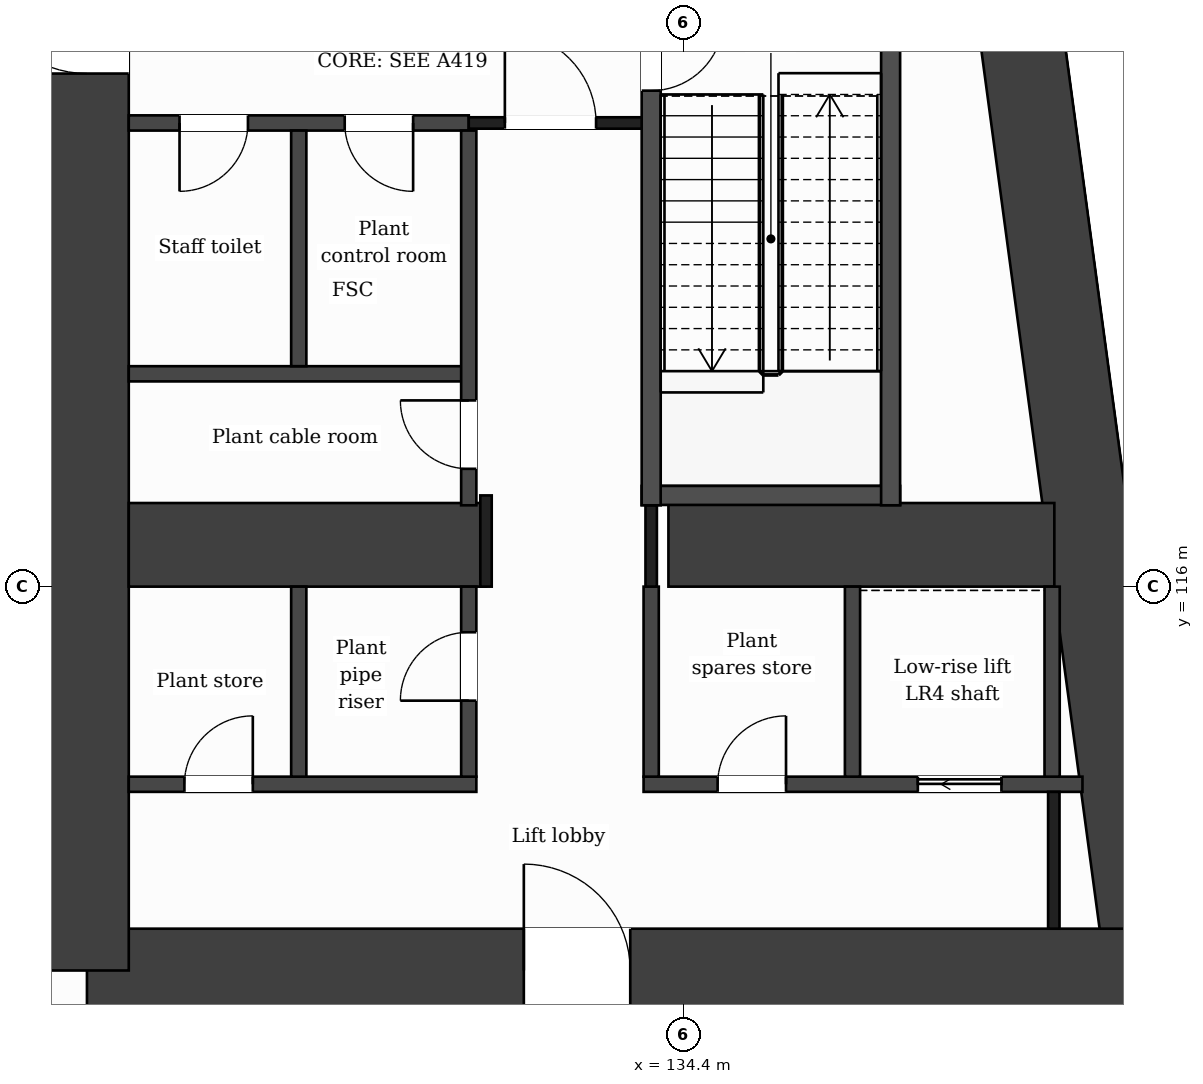
"""IFC4 building model, lengths in metres.
Left out: names, types, materials, properties, quantities, classifications, styles, units other than length and angle.
Written with IfcOpenShell. Run it as: python <this file> out.ifc"""

import sys

from ifc_helpers import new_model, si_unit, direction, frame, frame_2d, origin, place, context, subcontext, project, spatial, rectangle, extrude, element, fill, save


model = new_model("IFC4")
c1 = context("Model", 3, precision=1e-05, world=origin(), true_north=direction((0.0, 1.0)))
c2 = subcontext(c1, "Body", "Model", "MODEL_VIEW")
j1 = project(units=[si_unit("LENGTHUNIT", "METRE"), si_unit("PLANEANGLEUNIT", "RADIAN")], contexts=[c1])
p1 = place(None, origin())
s1 = spatial("IfcSite", under=j1, at=p1, CompositionType="ELEMENT")
p2 = place(p1, origin())
s2 = spatial("IfcBuilding", under=s1, at=p2, CompositionType="ELEMENT")
p3 = place(p2, frame((0.0, 0.0, 81.0)))
s3 = spatial("IfcBuildingStorey", under=s2, at=p3, CompositionType="ELEMENT", Elevation=81.0)
p4 = place(p3, frame((137.688, 131.85, 0.0), z_axis=(0.0, 0.0, 1.0), x_axis=(0.133411793472, -0.991060691059, 0.0)))
e1 = element("IfcWall", 1, at=p4, inside=s3, PredefinedType="SHEAR", context=c2, shape_type="SweptSolid", body=[
    extrude(rectangle(XDim=21.089, YDim=1.1, at=frame_2d((10.544, 0.0))), origin(), (0.0, 0.0, 1.0), 5.0),
])
p5 = place(p3, frame((140.502, 110.95, 0.0), z_axis=(0.0, 0.0, 1.0), x_axis=(-1.0, 0.0, 0.0)))
e2 = element("IfcWall", 2, at=p5, inside=s3, PredefinedType="SHEAR", context=c2, shape_type="SweptSolid", body=[
    extrude(rectangle(XDim=13.952, YDim=1.1, at=frame_2d((6.976, 0.0))), origin(), (0.0, 0.0, 1.0), 5.0),
])
p6 = place(p5, frame((6.804, 0.0, 0.0)))
e3 = element("IfcOpeningElement", 3, at=p6, cuts=e2, PredefinedType="OPENING", context=c2, shape_type="SweptSolid", body=[
    extrude(rectangle(XDim=1.4, YDim=2.1, at=frame_2d((0.7, 1.05))), frame((0.0, 0.56, 0.0), z_axis=(0.0, -1.0, 0.0), x_axis=(1.0, 0.0, 0.0)), (0.0, 0.0, 1.0), 1.12),
])
p7 = place(p3, frame((126.55, 110.95, 0.0), z_axis=(0.0, 0.0, 1.0), x_axis=(0.0, 1.0, 0.0)))
e4 = element("IfcWall", 4, at=p7, inside=s3, PredefinedType="SHEAR", context=c2, shape_type="SweptSolid", body=[
    extrude(rectangle(XDim=20.9, YDim=1.1, at=frame_2d((10.45, 0.0))), origin(), (0.0, 0.0, 1.0), 5.0),
])
p8 = place(p7, frame((17.45, 0.0, 0.0)))
e5 = element("IfcOpeningElement", 5, at=p8, cuts=e4, PredefinedType="OPENING", context=c2, shape_type="SweptSolid", body=[
    extrude(rectangle(XDim=1.2, YDim=2.1, at=frame_2d((0.6, 1.05))), frame((0.0, 0.56, 0.0), z_axis=(0.0, -1.0, 0.0), x_axis=(1.0, 0.0, 0.0)), (0.0, 0.0, 1.0), 1.12),
])
p9 = place(p7, frame((11.8, 0.0, 0.0)))
e6 = element("IfcOpeningElement", 6, at=p9, cuts=e4, PredefinedType="OPENING", context=c2, shape_type="SweptSolid", body=[
    extrude(rectangle(XDim=1.4, YDim=2.1, at=frame_2d((0.7, 1.05))), frame((0.0, 0.56, 0.0), z_axis=(0.0, -1.0, 0.0), x_axis=(1.0, 0.0, 0.0)), (0.0, 0.0, 1.0), 1.12),
])
p10 = place(p3, frame((127.1, 116.55, 0.0), z_axis=(0.0, 0.0, 1.0), x_axis=(1.0, 0.0, 0.0)))
e7 = element("IfcWall", 7, at=p10, inside=s3, PredefinedType="SHEAR", context=c2, shape_type="SweptSolid", body=[
    extrude(rectangle(XDim=4.7, YDim=1.1, at=frame_2d((2.35, 0.0))), origin(), (0.0, 0.0, 1.0), 5.0),
])
p11 = place(p3, frame((134.2, 116.55, 0.0), z_axis=(0.0, 0.0, 1.0), x_axis=(1.0, 0.0, 0.0)))
e8 = element("IfcWall", 8, at=p11, inside=s3, PredefinedType="SHEAR", context=c2, shape_type="SweptSolid", body=[
    extrude(rectangle(XDim=5.077, YDim=1.1, at=frame_2d((2.539, 0.0))), origin(), (0.0, 0.0, 1.0), 5.0),
])
p12 = place(p3, frame((127.1, 113.4, 0.0), z_axis=(0.0, 0.0, 1.0), x_axis=(1.0, 0.0, 0.0)))
e9 = element("IfcWall", 9, at=p12, inside=s3, PredefinedType="PARTITIONING", context=c2, shape_type="SweptSolid", body=[
    extrude(rectangle(XDim=4.573, YDim=0.2, at=frame_2d((2.287, 0.0))), origin(), (0.0, 0.0, 1.0), 4.55),
])
p13 = place(p12, frame((0.732, 0.0, 0.0)))
e10 = element("IfcOpeningElement", 10, at=p13, cuts=e9, PredefinedType="OPENING", context=c2, shape_type="SweptSolid", body=[
    extrude(rectangle(XDim=0.9, YDim=2.1, at=frame_2d((0.45, 1.05))), frame((0.0, 0.11, 0.0), z_axis=(0.0, -1.0, 0.0), x_axis=(1.0, 0.0, 0.0)), (0.0, 0.0, 1.0), 0.22),
])
p14 = place(p3, frame((133.873, 113.4, 0.0), z_axis=(0.0, 0.0, 1.0), x_axis=(1.0, 0.0, 0.0)))
e11 = element("IfcWall", 11, at=p14, inside=s3, PredefinedType="PARTITIONING", context=c2, shape_type="SweptSolid", body=[
    extrude(rectangle(XDim=5.774, YDim=0.2, at=frame_2d((2.887, 0.0))), origin(), (0.0, 0.0, 1.0), 4.55),
])
p15 = place(p14, frame((3.608, 0.0, 0.0)))
e12 = element("IfcOpeningElement", 12, at=p15, cuts=e11, PredefinedType="OPENING", context=c2, shape_type="SweptSolid", body=[
    extrude(rectangle(XDim=1.1, YDim=2.1, at=frame_2d((0.55, 1.05))), frame((0.0, 0.11, 0.0), z_axis=(0.0, -1.0, 0.0), x_axis=(1.0, 0.0, 0.0)), (0.0, 0.0, 1.0), 0.22),
])
p16 = place(p14, frame((0.974, 0.0, 0.0)))
e13 = element("IfcOpeningElement", 13, at=p16, cuts=e11, PredefinedType="OPENING", context=c2, shape_type="SweptSolid", body=[
    extrude(rectangle(XDim=0.9, YDim=2.1, at=frame_2d((0.45, 1.05))), frame((0.0, 0.11, 0.0), z_axis=(0.0, -1.0, 0.0), x_axis=(1.0, 0.0, 0.0)), (0.0, 0.0, 1.0), 0.22),
])
p17 = place(p3, frame((133.848, 117.2, 0.0), z_axis=(0.0, 0.0, 1.0), x_axis=(1.0, 0.0, 0.0)))
e14 = element("IfcWall", 14, at=p17, inside=s3, PredefinedType="PARTITIONING", context=c2, shape_type="SweptSolid", body=[
    extrude(rectangle(XDim=3.4, YDim=0.25, at=frame_2d((1.7, 0.0))), origin(), (0.0, 0.0, 1.0), 4.55),
])
p18 = place(p3, frame((127.1, 118.8, 0.0), z_axis=(0.0, 0.0, 1.0), x_axis=(1.0, 0.0, 0.0)))
e15 = element("IfcWall", 15, at=p18, inside=s3, PredefinedType="PARTITIONING", context=c2, shape_type="SweptSolid", body=[
    extrude(rectangle(XDim=4.473, YDim=0.2, at=frame_2d((2.236, 0.0))), origin(), (0.0, 0.0, 1.0), 4.55),
])
p19 = place(p3, frame((127.1, 122.1, 0.0), z_axis=(0.0, 0.0, 1.0), x_axis=(1.0, 0.0, 0.0)))
e16 = element("IfcWall", 16, at=p19, inside=s3, PredefinedType="PARTITIONING", context=c2, shape_type="SweptSolid", body=[
    extrude(rectangle(XDim=4.473, YDim=0.2, at=frame_2d((2.236, 0.0))), origin(), (0.0, 0.0, 1.0), 4.55),
])
p20 = place(p19, frame((2.841, 0.0, 0.0)))
e17 = element("IfcOpeningElement", 17, at=p20, cuts=e16, PredefinedType="OPENING", context=c2, shape_type="SweptSolid", body=[
    extrude(rectangle(XDim=0.9, YDim=2.1, at=frame_2d((0.45, 1.05))), frame((0.0, 0.11, 0.0), z_axis=(0.0, -1.0, 0.0), x_axis=(1.0, 0.0, 0.0)), (0.0, 0.0, 1.0), 0.22),
])
p21 = place(p19, frame((0.668, 0.0, 0.0)))
e18 = element("IfcOpeningElement", 18, at=p21, cuts=e16, PredefinedType="OPENING", context=c2, shape_type="SweptSolid", body=[
    extrude(rectangle(XDim=0.9, YDim=2.1, at=frame_2d((0.45, 1.05))), frame((0.0, 0.11, 0.0), z_axis=(0.0, -1.0, 0.0), x_axis=(1.0, 0.0, 0.0)), (0.0, 0.0, 1.0), 0.22),
])
p22 = place(p3, frame((131.573, 122.1, 0.0), z_axis=(0.0, 0.0, 1.0), x_axis=(1.0, 0.0, 0.0)))
e19 = element("IfcWall", 19, at=p22, inside=s3, PredefinedType="PARTITIONING", context=c2, shape_type="SweptSolid", body=[
    extrude(rectangle(XDim=2.4, YDim=0.15, at=frame_2d((1.2, 0.0))), origin(), (0.0, 0.0, 1.0), 4.55),
])
p23 = place(p22, frame((0.475, 0.0, 0.0)))
e20 = element("IfcOpeningElement", 20, at=p23, cuts=e19, PredefinedType="OPENING", context=c2, shape_type="SweptSolid", body=[
    extrude(rectangle(XDim=1.2, YDim=2.1, at=frame_2d((0.6, 1.05))), frame((0.0, 0.085, 0.0), z_axis=(0.0, -1.0, 0.0), x_axis=(1.0, 0.0, 0.0)), (0.0, 0.0, 1.0), 0.17),
])
p24 = place(p3, frame((129.336, 113.5, 0.0), z_axis=(0.0, 0.0, 1.0), x_axis=(0.0, 1.0, 0.0)))
e21 = element("IfcWall", 21, at=p24, inside=s3, PredefinedType="PARTITIONING", context=c2, shape_type="SweptSolid", body=[
    extrude(rectangle(XDim=2.5, YDim=0.2, at=frame_2d((1.25, 0.0))), origin(), (0.0, 0.0, 1.0), 4.55),
])
p25 = place(p3, frame((129.336, 118.9, 0.0), z_axis=(0.0, 0.0, 1.0), x_axis=(0.0, 1.0, 0.0)))
e22 = element("IfcWall", 22, at=p25, inside=s3, PredefinedType="PARTITIONING", context=c2, shape_type="SweptSolid", body=[
    extrude(rectangle(XDim=3.1, YDim=0.2, at=frame_2d((1.55, 0.0))), origin(), (0.0, 0.0, 1.0), 4.55),
])
p26 = place(p3, frame((131.573, 113.5, 0.0), z_axis=(0.0, 0.0, 1.0), x_axis=(0.0, 1.0, 0.0)))
e23 = element("IfcWall", 23, at=p26, inside=s3, PredefinedType="PARTITIONING", context=c2, shape_type="SweptSolid", body=[
    extrude(rectangle(XDim=2.5, YDim=0.2, at=frame_2d((1.25, 0.0))), origin(), (0.0, 0.0, 1.0), 4.55),
])
p27 = place(p26, frame((1.0, 0.0, 0.0)))
e24 = element("IfcOpeningElement", 24, at=p27, cuts=e23, PredefinedType="OPENING", context=c2, shape_type="SweptSolid", body=[
    extrude(rectangle(XDim=0.9, YDim=2.1, at=frame_2d((0.45, 1.05))), frame((0.0, 0.11, 0.0), z_axis=(0.0, -1.0, 0.0), x_axis=(1.0, 0.0, 0.0)), (0.0, 0.0, 1.0), 0.22),
])
p28 = place(p3, frame((131.573, 117.07, 0.0), z_axis=(0.0, 0.0, 1.0), x_axis=(0.0, 1.0, 0.0)))
e25 = element("IfcWall", 25, at=p28, inside=s3, PredefinedType="PARTITIONING", context=c2, shape_type="SweptSolid", body=[
    extrude(rectangle(XDim=4.93, YDim=0.2, at=frame_2d((2.465, 0.0))), origin(), (0.0, 0.0, 1.0), 4.55),
])
p29 = place(p28, frame((0.48, 0.0, 0.0)))
e26 = element("IfcOpeningElement", 26, at=p29, cuts=e25, PredefinedType="OPENING", context=c2, shape_type="SweptSolid", body=[
    extrude(rectangle(XDim=0.9, YDim=2.1, at=frame_2d((0.45, 1.05))), frame((0.0, 0.11, 0.0), z_axis=(0.0, -1.0, 0.0), x_axis=(1.0, 0.0, 0.0)), (0.0, 0.0, 1.0), 0.22),
])
p30 = place(p3, frame((131.8, 116.0, 0.0), z_axis=(0.0, 0.0, 1.0), x_axis=(0.0, 1.0, 0.0)))
e27 = element("IfcWall", 27, at=p30, inside=s3, PredefinedType="PARTITIONING", context=c2, shape_type="SweptSolid", body=[
    extrude(rectangle(XDim=1.2, YDim=0.15, at=frame_2d((0.6, 0.0))), origin(), (0.0, 0.0, 1.0), 4.55),
])
p31 = place(p3, frame((133.973, 113.5, 0.0), z_axis=(0.0, 0.0, 1.0), x_axis=(0.0, 1.0, 0.0)))
e28 = element("IfcWall", 28, at=p31, inside=s3, PredefinedType="PARTITIONING", context=c2, shape_type="SweptSolid", body=[
    extrude(rectangle(XDim=2.5, YDim=0.2, at=frame_2d((1.25, 0.0))), origin(), (0.0, 0.0, 1.0), 4.55),
])
p32 = place(p3, frame((133.973, 116.0, 0.0), z_axis=(0.0, 0.0, 1.0), x_axis=(0.0, 1.0, 0.0)))
e29 = element("IfcWall", 29, at=p32, inside=s3, PredefinedType="PARTITIONING", context=c2, shape_type="SweptSolid", body=[
    extrude(rectangle(XDim=1.07, YDim=0.15, at=frame_2d((0.535, 0.0))), origin(), (0.0, 0.0, 1.0), 4.55),
])
p33 = place(p3, frame((133.973, 117.07, 0.0), z_axis=(0.0, 0.0, 1.0), x_axis=(0.0, 1.0, 0.0)))
e30 = element("IfcWall", 30, at=p33, inside=s3, PredefinedType="PARTITIONING", context=c2, shape_type="SweptSolid", body=[
    extrude(rectangle(XDim=6.755, YDim=0.25, at=frame_2d((3.377, 0.0))), origin(), (0.0, 0.0, 1.0), 4.55),
])
p34 = place(p33, frame((5.455, 0.0, 0.0)))
e31 = element("IfcOpeningElement", 31, at=p34, cuts=e30, PredefinedType="OPENING", context=c2, shape_type="SweptSolid", body=[
    extrude(rectangle(XDim=0.95, YDim=2.1, at=frame_2d((0.475, 1.05))), frame((0.0, 0.135, 0.0), z_axis=(0.0, -1.0, 0.0), x_axis=(1.0, 0.0, 0.0)), (0.0, 0.0, 1.0), 0.27),
])
p35 = place(p3, frame((136.622, 113.5, 0.0), z_axis=(0.0, 0.0, 1.0), x_axis=(0.0, 1.0, 0.0)))
e32 = element("IfcWall", 32, at=p35, inside=s3, PredefinedType="PARTITIONING", context=c2, shape_type="SweptSolid", body=[
    extrude(rectangle(XDim=2.5, YDim=0.2, at=frame_2d((1.25, 0.0))), origin(), (0.0, 0.0, 1.0), 4.55),
])
p36 = place(p3, frame((137.123, 117.07, 0.0), z_axis=(0.0, 0.0, 1.0), x_axis=(0.0, 1.0, 0.0)))
e33 = element("IfcWall", 33, at=p36, inside=s3, PredefinedType="PARTITIONING", context=c2, shape_type="SweptSolid", body=[
    extrude(rectangle(XDim=6.755, YDim=0.25, at=frame_2d((3.377, 0.0))), origin(), (0.0, 0.0, 1.0), 4.55),
])
p37 = place(p3, frame((139.248, 113.5, 0.0), z_axis=(0.0, 0.0, 1.0), x_axis=(0.0, 1.0, 0.0)))
e34 = element("IfcWall", 34, at=p37, inside=s3, PredefinedType="PARTITIONING", context=c2, shape_type="SweptSolid", body=[
    extrude(rectangle(XDim=2.5, YDim=0.2, at=frame_2d((1.25, 0.0))), origin(), (0.0, 0.0, 1.0), 4.55),
])
p38 = place(p3, frame((139.27, 111.5, 0.0), z_axis=(0.0, 0.0, 1.0), x_axis=(0.0, 1.0, 0.0)))
e35 = element("IfcWall", 35, at=p38, inside=s3, PredefinedType="PARTITIONING", context=c2, shape_type="SweptSolid", body=[
    extrude(rectangle(XDim=1.8, YDim=0.15, at=frame_2d((0.9, 0.0))), origin(), (0.0, 0.0, 1.0), 4.55),
])
p39 = place(p23, origin())
e36 = element("IfcDoor", 36, at=p39, inside=s3, OperationType="SINGLE_SWING_LEFT", PredefinedType="DOOR", context=c2, shape_type="SweptSolid", body=[
    extrude(rectangle(XDim=1.2, YDim=2.1, at=frame_2d((0.6, 1.05))), frame((0.0, 0.025, 0.0), z_axis=(0.0, -1.0, 0.0), x_axis=(1.0, 0.0, 0.0)), (0.0, 0.0, 1.0), 0.05),
])
fill(e20, e36)
p40 = place(p20, origin())
e37 = element("IfcDoor", 37, at=p40, inside=s3, OperationType="SINGLE_SWING_RIGHT", PredefinedType="DOOR", context=c2, shape_type="SweptSolid", body=[
    extrude(rectangle(XDim=0.9, YDim=2.1, at=frame_2d((0.45, 1.05))), frame((0.0, 0.025, 0.0), z_axis=(0.0, -1.0, 0.0), x_axis=(1.0, 0.0, 0.0)), (0.0, 0.0, 1.0), 0.05),
])
fill(e17, e37)
p41 = place(p21, origin())
e38 = element("IfcDoor", 38, at=p41, inside=s3, OperationType="SINGLE_SWING_LEFT", PredefinedType="DOOR", context=c2, shape_type="SweptSolid", body=[
    extrude(rectangle(XDim=0.9, YDim=2.1, at=frame_2d((0.45, 1.05))), frame((0.0, 0.025, 0.0), z_axis=(0.0, -1.0, 0.0), x_axis=(1.0, 0.0, 0.0)), (0.0, 0.0, 1.0), 0.05),
])
fill(e18, e38)
p42 = place(p34, origin())
e39 = element("IfcDoor", 39, at=p42, inside=s3, OperationType="SINGLE_SWING_RIGHT", PredefinedType="DOOR", context=c2, shape_type="SweptSolid", body=[
    extrude(rectangle(XDim=0.95, YDim=2.1, at=frame_2d((0.475, 1.05))), frame((0.0, 0.025, 0.0), z_axis=(0.0, -1.0, 0.0), x_axis=(1.0, 0.0, 0.0)), (0.0, 0.0, 1.0), 0.05),
])
fill(e31, e39)
p43 = place(p29, origin())
e40 = element("IfcDoor", 40, at=p43, inside=s3, OperationType="SINGLE_SWING_RIGHT", PredefinedType="DOOR", context=c2, shape_type="SweptSolid", body=[
    extrude(rectangle(XDim=0.9, YDim=2.1, at=frame_2d((0.45, 1.05))), frame((0.0, 0.025, 0.0), z_axis=(0.0, -1.0, 0.0), x_axis=(1.0, 0.0, 0.0)), (0.0, 0.0, 1.0), 0.05),
])
fill(e26, e40)
p44 = place(p15, origin())
e41 = element("IfcDoor", 41, at=p44, inside=s3, OperationType="SLIDING_TO_LEFT", PredefinedType="DOOR", context=c2, shape_type="SweptSolid", body=[
    extrude(rectangle(XDim=1.1, YDim=2.1, at=frame_2d((0.55, 1.05))), frame((0.0, 0.025, 0.0), z_axis=(0.0, -1.0, 0.0), x_axis=(1.0, 0.0, 0.0)), (0.0, 0.0, 1.0), 0.05),
])
fill(e12, e41)
p45 = place(p16, origin())
e42 = element("IfcDoor", 42, at=p45, inside=s3, OperationType="SINGLE_SWING_RIGHT", PredefinedType="DOOR", context=c2, shape_type="SweptSolid", body=[
    extrude(rectangle(XDim=0.9, YDim=2.1, at=frame_2d((0.45, 1.05))), frame((0.0, 0.025, 0.0), z_axis=(0.0, -1.0, 0.0), x_axis=(1.0, 0.0, 0.0)), (0.0, 0.0, 1.0), 0.05),
])
fill(e13, e42)
p46 = place(p27, origin())
e43 = element("IfcDoor", 43, at=p46, inside=s3, OperationType="SINGLE_SWING_LEFT", PredefinedType="DOOR", context=c2, shape_type="SweptSolid", body=[
    extrude(rectangle(XDim=0.9, YDim=2.1, at=frame_2d((0.45, 1.05))), frame((0.0, 0.025, 0.0), z_axis=(0.0, -1.0, 0.0), x_axis=(1.0, 0.0, 0.0)), (0.0, 0.0, 1.0), 0.05),
])
fill(e24, e43)
p47 = place(p13, origin())
e44 = element("IfcDoor", 44, at=p47, inside=s3, OperationType="SINGLE_SWING_RIGHT", PredefinedType="DOOR", context=c2, shape_type="SweptSolid", body=[
    extrude(rectangle(XDim=0.9, YDim=2.1, at=frame_2d((0.45, 1.05))), frame((0.0, 0.025, 0.0), z_axis=(0.0, -1.0, 0.0), x_axis=(1.0, 0.0, 0.0)), (0.0, 0.0, 1.0), 0.05),
])
fill(e10, e44)
p48 = place(p6, origin())
e45 = element("IfcDoor", 45, at=p48, inside=s3, OperationType="SINGLE_SWING_RIGHT", PredefinedType="DOOR", context=c2, shape_type="SweptSolid", body=[
    extrude(rectangle(XDim=1.4, YDim=2.1, at=frame_2d((0.7, 1.05))), frame((0.0, 0.025, 0.0), z_axis=(0.0, -1.0, 0.0), x_axis=(1.0, 0.0, 0.0)), (0.0, 0.0, 1.0), 0.05),
])
fill(e3, e45)
p49 = place(p9, origin())
e46 = element("IfcDoor", 46, at=p49, inside=s3, OperationType="SINGLE_SWING_RIGHT", PredefinedType="DOOR", context=c2, shape_type="SweptSolid", body=[
    extrude(rectangle(XDim=1.4, YDim=2.1, at=frame_2d((0.7, 1.05))), frame((0.0, 0.025, 0.0), z_axis=(0.0, -1.0, 0.0), x_axis=(1.0, 0.0, 0.0)), (0.0, 0.0, 1.0), 0.05),
])
fill(e6, e46)
save(model, sys.argv[1])
